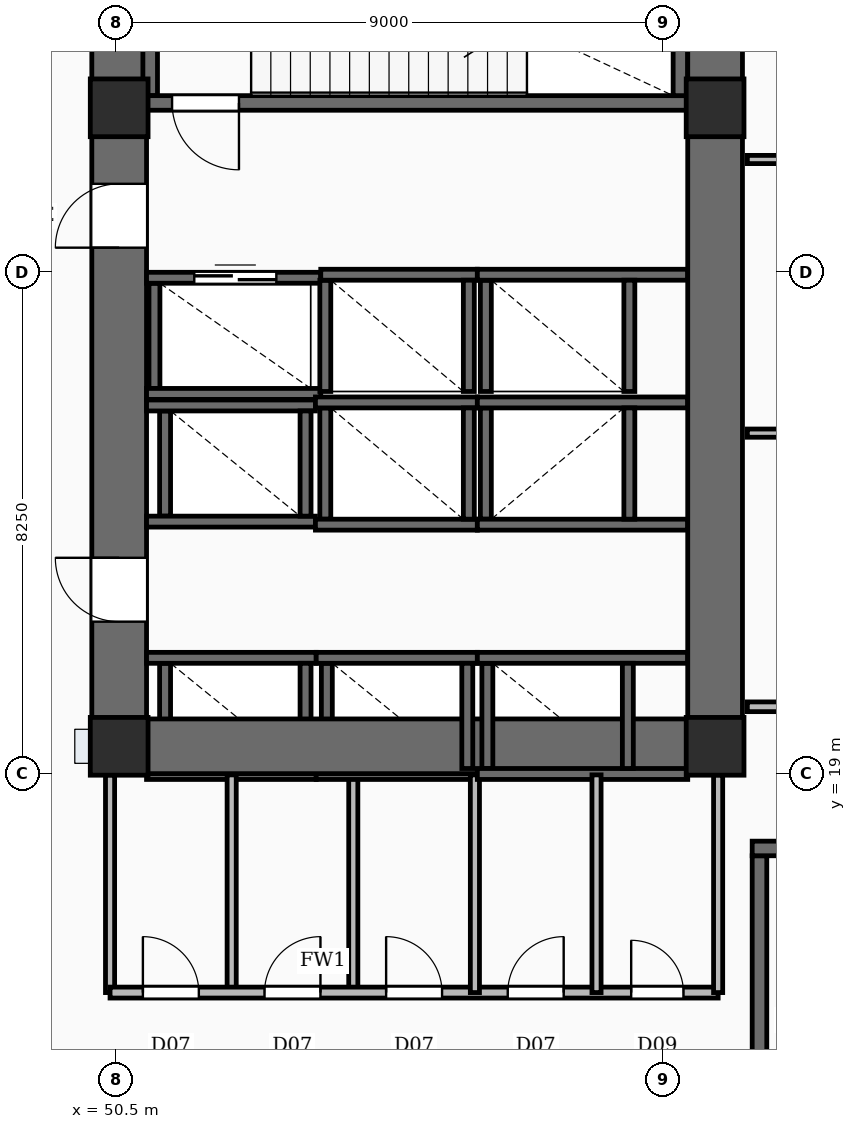
"""IFC4 building model, lengths in metres.
Left out: names, types, materials, properties, quantities, classifications, styles, units other than length and angle.
Written with IfcOpenShell. Run it as: python <this file> out.ifc"""

import sys

from ifc_helpers import new_model, si_unit, direction, frame, frame_2d, origin, origin_2d, place, context, subcontext, project, spatial, rectangle, extrude, element, fill, save


model = new_model("IFC4")
c1 = context("Model", 3, precision=1e-05, world=origin(), true_north=direction((0.0, 1.0)))
c2 = subcontext(c1, "Body", "Model", "MODEL_VIEW")
j1 = project(units=[si_unit("LENGTHUNIT", "METRE"), si_unit("PLANEANGLEUNIT", "RADIAN")], contexts=[c1])
p1 = place(None, origin())
s1 = spatial("IfcSite", under=j1, at=p1, CompositionType="ELEMENT")
p2 = place(p1, origin())
s2 = spatial("IfcBuilding", under=s1, at=p2, CompositionType="ELEMENT")
p3 = place(p2, frame((0.0, 0.0, 18.0)))
s3 = spatial("IfcBuildingStorey", under=s2, at=p3, CompositionType="ELEMENT", Elevation=18.0)
p4 = place(p3, frame((50.55, 19.0, -0.35), z_axis=(0.0, 0.0, 1.0), x_axis=(0.0, 1.0, 0.0)))
e1 = element("IfcWall", 1, at=p4, inside=s3, PredefinedType="SHEAR", context=c2, shape_type="SweptSolid", body=[
    extrude(rectangle(XDim=20.8, YDim=0.9, at=frame_2d((10.4, 0.0))), origin(), (0.0, 0.0, 1.0), 5.0),
])
p5 = place(p4, frame((2.5, 0.0, 0.35)))
e2 = element("IfcOpeningElement", 2, at=p5, cuts=e1, PredefinedType="OPENING", context=c2, shape_type="SweptSolid", body=[
    extrude(rectangle(XDim=1.05, YDim=2.15, at=frame_2d((0.525, 1.075))), frame((0.0, 0.46, 0.0), z_axis=(0.0, -1.0, 0.0), x_axis=(1.0, 0.0, 0.0)), (0.0, 0.0, 1.0), 0.92),
])
p6 = place(p4, frame((8.65, 0.0, 0.35)))
e3 = element("IfcOpeningElement", 3, at=p6, cuts=e1, PredefinedType="OPENING", context=c2, shape_type="SweptSolid", body=[
    extrude(rectangle(XDim=1.05, YDim=2.15, at=frame_2d((0.525, 1.075))), frame((0.0, 0.46, 0.0), z_axis=(0.0, -1.0, 0.0), x_axis=(1.0, 0.0, 0.0)), (0.0, 0.0, 1.0), 0.92),
])
p7 = place(p4, frame((14.62, 0.0, 0.35)))
e4 = element("IfcOpeningElement", 4, at=p7, cuts=e1, PredefinedType="OPENING", context=c2, shape_type="SweptSolid", body=[
    extrude(rectangle(XDim=1.1, YDim=2.15, at=frame_2d((0.55, 1.075))), frame((0.0, 0.46, 0.0), z_axis=(0.0, -1.0, 0.0), x_axis=(1.0, 0.0, 0.0)), (0.0, 0.0, 1.0), 0.92),
])
p8 = place(p3, frame((60.35, 19.0, -0.35), z_axis=(0.0, 0.0, 1.0), x_axis=(0.0, 1.0, 0.0)))
e5 = element("IfcWall", 5, at=p8, inside=s3, PredefinedType="SHEAR", context=c2, shape_type="SweptSolid", body=[
    extrude(rectangle(XDim=20.8, YDim=0.9, at=frame_2d((10.4, 0.0))), origin(), (0.0, 0.0, 1.0), 5.0),
])
p9 = place(p3, frame((51.0, 19.45, -0.35), z_axis=(0.0, 0.0, 1.0), x_axis=(1.0, 0.0, 0.0)))
e6 = element("IfcWall", 6, at=p9, inside=s3, PredefinedType="SHEAR", context=c2, shape_type="SweptSolid", body=[
    extrude(rectangle(XDim=8.9, YDim=0.9, at=frame_2d((4.45, 0.0))), origin(), (0.0, 0.0, 1.0), 5.0),
])
for number, where, z_axis, x_axis in (
    (7, (50.55, 19.45, -0.35), (0.0, 0.0, 1.0), (1.0, 0.0, 0.0)),
    (8, (60.35, 19.45, -0.35), (0.0, 0.0, 1.0), (1.0, 0.0, 0.0)),
    (9, (50.55, 29.95, -0.35), (0.0, 0.0, 1.0), (1.0, 0.0, 0.0)),
    (10, (60.35, 29.95, -0.35), (0.0, 0.0, 1.0), (1.0, 0.0, 0.0)),
):
    element("IfcColumn", number, at=place(p3, frame(where, z_axis=z_axis, x_axis=x_axis)), inside=s3, PredefinedType="COLUMN", context=c2, shape_type="SweptSolid", body=[
        extrude(rectangle(XDim=0.95, YDim=0.95, at=origin_2d()), origin(), (0.0, 0.0, 1.0), 5.0),
    ])
p10 = place(p3, frame((60.96, 17.77, 0.0), z_axis=(0.0, 0.0, 1.0), x_axis=(1.0, 0.0, 0.0)))
e11 = element("IfcWall", 11, at=p10, inside=s3, PredefinedType="SOLIDWALL", context=c2, shape_type="SweptSolid", body=[
    extrude(rectangle(XDim=9.88, YDim=0.24, at=frame_2d((4.94, 0.0))), origin(), (0.0, 0.0, 1.0), 4.65),
])
p11 = place(p10, frame((0.69, 0.0, 0.0)))
e12 = element("IfcOpeningElement", 12, at=p11, cuts=e11, PredefinedType="OPENING", context=c2, shape_type="SweptSolid", body=[
    extrude(rectangle(XDim=1.1, YDim=2.15, at=frame_2d((0.55, 1.075))), frame((0.0, 0.13, 0.0), z_axis=(0.0, -1.0, 0.0), x_axis=(1.0, 0.0, 0.0)), (0.0, 0.0, 1.0), 0.26),
])
p12 = place(p3, frame((61.08, 13.5, 0.0), z_axis=(0.0, 0.0, 1.0), x_axis=(0.0, 1.0, 0.0)))
e13 = element("IfcWall", 13, at=p12, inside=s3, PredefinedType="SOLIDWALL", context=c2, shape_type="SweptSolid", body=[
    extrude(rectangle(XDim=4.15, YDim=0.24, at=frame_2d((2.075, 0.0))), origin(), (0.0, 0.0, 1.0), 4.65),
])
p13 = place(p3, frame((59.9, 30.03, 0.0), z_axis=(0.0, 0.0, 1.0), x_axis=(-1.0, 0.0, 0.0)))
e14 = element("IfcWall", 14, at=p13, inside=s3, PredefinedType="SOLIDWALL", context=c2, shape_type="SweptSolid", body=[
    extrude(rectangle(XDim=8.9, YDim=0.24, at=frame_2d((4.45, 0.0))), origin(), (0.0, 0.0, 1.0), 4.65),
])
p14 = place(p13, frame((7.38, 0.0, 0.0)))
e15 = element("IfcOpeningElement", 15, at=p14, cuts=e14, PredefinedType="OPENING", context=c2, shape_type="SweptSolid", body=[
    extrude(rectangle(XDim=1.1, YDim=2.15, at=frame_2d((0.55, 1.075))), frame((0.0, 0.13, 0.0), z_axis=(0.0, -1.0, 0.0), x_axis=(1.0, 0.0, 0.0)), (0.0, 0.0, 1.0), 0.26),
])
for number, where, z_axis, x_axis in (
    (16, (51.06, 30.15, 0.0), (0.0, 0.0, 1.0), (0.0, 1.0, 0.0)),
    (17, (59.78, 30.15, 0.0), (0.0, 0.0, 1.0), (0.0, 1.0, 0.0)),
):
    element("IfcWall", number, at=place(p3, frame(where, z_axis=z_axis, x_axis=x_axis)), inside=s3, PredefinedType="SOLIDWALL", context=c2, shape_type="SweptSolid", body=[
        extrude(rectangle(XDim=3.23, YDim=0.24, at=frame_2d((1.615, 0.0))), origin(), (0.0, 0.0, 1.0), 4.65),
    ])
for number, where, z_axis, x_axis in (
    (18, (51.0, 20.905, 0.0), (0.0, 0.0, 1.0), (1.0, 0.0, 0.0)),
    (19, (51.0, 18.995, 0.0), (0.0, 0.0, 1.0), (1.0, 0.0, 0.0)),
):
    element("IfcWall", number, at=place(p3, frame(where, z_axis=z_axis, x_axis=x_axis)), inside=s3, PredefinedType="SOLIDWALL", context=c2, shape_type="SweptSolid", body=[
        extrude(rectangle(XDim=2.79, YDim=0.18, at=frame_2d((1.395, 0.0))), origin(), (0.0, 0.0, 1.0), 4.65),
    ])
for number, where, z_axis, x_axis in (
    (20, (51.305, 19.085, 0.0), (0.0, 0.0, 1.0), (0.0, 1.0, 0.0)),
    (21, (53.615, 19.085, 0.0), (0.0, 0.0, 1.0), (0.0, 1.0, 0.0)),
):
    element("IfcWall", number, at=place(p3, frame(where, z_axis=z_axis, x_axis=x_axis)), inside=s3, PredefinedType="SOLIDWALL", context=c2, shape_type="SweptSolid", body=[
        extrude(rectangle(XDim=1.73, YDim=0.18, at=frame_2d((0.865, 0.0))), origin(), (0.0, 0.0, 1.0), 4.65),
    ])
for number, where, z_axis, x_axis in (
    (22, (53.79, 20.905, 0.0), (0.0, 0.0, 1.0), (1.0, 0.0, 0.0)),
    (23, (53.79, 18.995, 0.0), (0.0, 0.0, 1.0), (1.0, 0.0, 0.0)),
):
    element("IfcWall", number, at=place(p3, frame(where, z_axis=z_axis, x_axis=x_axis)), inside=s3, PredefinedType="SOLIDWALL", context=c2, shape_type="SweptSolid", body=[
        extrude(rectangle(XDim=2.65, YDim=0.18, at=frame_2d((1.325, 0.0))), origin(), (0.0, 0.0, 1.0), 4.65),
    ])
for number, where, z_axis, x_axis in (
    (24, (53.965, 19.085, 0.0), (0.0, 0.0, 1.0), (0.0, 1.0, 0.0)),
    (25, (56.275, 19.085, 0.0), (0.0, 0.0, 1.0), (0.0, 1.0, 0.0)),
):
    element("IfcWall", number, at=place(p3, frame(where, z_axis=z_axis, x_axis=x_axis)), inside=s3, PredefinedType="SOLIDWALL", context=c2, shape_type="SweptSolid", body=[
        extrude(rectangle(XDim=1.73, YDim=0.18, at=frame_2d((0.865, 0.0))), origin(), (0.0, 0.0, 1.0), 4.65),
    ])
for number, where, z_axis, x_axis in (
    (26, (56.44, 20.905, 0.0), (0.0, 0.0, 1.0), (1.0, 0.0, 0.0)),
    (27, (56.44, 18.995, 0.0), (0.0, 0.0, 1.0), (1.0, 0.0, 0.0)),
):
    element("IfcWall", number, at=place(p3, frame(where, z_axis=z_axis, x_axis=x_axis)), inside=s3, PredefinedType="SOLIDWALL", context=c2, shape_type="SweptSolid", body=[
        extrude(rectangle(XDim=3.46, YDim=0.18, at=frame_2d((1.73, 0.0))), origin(), (0.0, 0.0, 1.0), 4.65),
    ])
for number, where, z_axis, x_axis in (
    (28, (56.605, 19.085, 0.0), (0.0, 0.0, 1.0), (0.0, 1.0, 0.0)),
    (29, (58.915, 19.085, 0.0), (0.0, 0.0, 1.0), (0.0, 1.0, 0.0)),
):
    element("IfcWall", number, at=place(p3, frame(where, z_axis=z_axis, x_axis=x_axis)), inside=s3, PredefinedType="SOLIDWALL", context=c2, shape_type="SweptSolid", body=[
        extrude(rectangle(XDim=1.73, YDim=0.18, at=frame_2d((0.865, 0.0))), origin(), (0.0, 0.0, 1.0), 4.65),
    ])
for number, where, z_axis, x_axis in (
    (30, (51.0, 25.055, 0.0), (0.0, 0.0, 1.0), (1.0, 0.0, 0.0)),
    (31, (51.0, 23.145, 0.0), (0.0, 0.0, 1.0), (1.0, 0.0, 0.0)),
):
    element("IfcWall", number, at=place(p3, frame(where, z_axis=z_axis, x_axis=x_axis)), inside=s3, PredefinedType="SOLIDWALL", context=c2, shape_type="SweptSolid", body=[
        extrude(rectangle(XDim=2.778, YDim=0.18, at=frame_2d((1.389, 0.0))), origin(), (0.0, 0.0, 1.0), 4.65),
    ])
for number, where, z_axis, x_axis in (
    (32, (51.305, 23.235, 0.0), (0.0, 0.0, 1.0), (0.0, 1.0, 0.0)),
    (33, (53.615, 23.235, 0.0), (0.0, 0.0, 1.0), (0.0, 1.0, 0.0)),
):
    element("IfcWall", number, at=place(p3, frame(where, z_axis=z_axis, x_axis=x_axis)), inside=s3, PredefinedType="SOLIDWALL", context=c2, shape_type="SweptSolid", body=[
        extrude(rectangle(XDim=1.73, YDim=0.18, at=frame_2d((0.865, 0.0))), origin(), (0.0, 0.0, 1.0), 4.65),
    ])
for number, where, z_axis, x_axis in (
    (34, (53.778, 25.105, 0.0), (0.0, 0.0, 1.0), (1.0, 0.0, 0.0)),
    (35, (53.778, 23.095, 0.0), (0.0, 0.0, 1.0), (1.0, 0.0, 0.0)),
):
    element("IfcWall", number, at=place(p3, frame(where, z_axis=z_axis, x_axis=x_axis)), inside=s3, PredefinedType="SOLIDWALL", context=c2, shape_type="SweptSolid", body=[
        extrude(rectangle(XDim=2.662, YDim=0.18, at=frame_2d((1.331, 0.0))), origin(), (0.0, 0.0, 1.0), 4.65),
    ])
for number, where, z_axis, x_axis in (
    (36, (53.94, 23.185, 0.0), (0.0, 0.0, 1.0), (0.0, 1.0, 0.0)),
    (37, (56.3, 23.185, 0.0), (0.0, 0.0, 1.0), (0.0, 1.0, 0.0)),
):
    element("IfcWall", number, at=place(p3, frame(where, z_axis=z_axis, x_axis=x_axis)), inside=s3, PredefinedType="SOLIDWALL", context=c2, shape_type="SweptSolid", body=[
        extrude(rectangle(XDim=1.83, YDim=0.18, at=frame_2d((0.915, 0.0))), origin(), (0.0, 0.0, 1.0), 4.65),
    ])
for number, where, z_axis, x_axis in (
    (38, (56.44, 25.105, 0.0), (0.0, 0.0, 1.0), (1.0, 0.0, 0.0)),
    (39, (56.44, 23.095, 0.0), (0.0, 0.0, 1.0), (1.0, 0.0, 0.0)),
):
    element("IfcWall", number, at=place(p3, frame(where, z_axis=z_axis, x_axis=x_axis)), inside=s3, PredefinedType="SOLIDWALL", context=c2, shape_type="SweptSolid", body=[
        extrude(rectangle(XDim=3.46, YDim=0.18, at=frame_2d((1.73, 0.0))), origin(), (0.0, 0.0, 1.0), 4.65),
    ])
for number, where, z_axis, x_axis in (
    (40, (56.58, 23.185, 0.0), (0.0, 0.0, 1.0), (0.0, 1.0, 0.0)),
    (41, (58.94, 23.185, 0.0), (0.0, 0.0, 1.0), (0.0, 1.0, 0.0)),
):
    element("IfcWall", number, at=place(p3, frame(where, z_axis=z_axis, x_axis=x_axis)), inside=s3, PredefinedType="SOLIDWALL", context=c2, shape_type="SweptSolid", body=[
        extrude(rectangle(XDim=1.83, YDim=0.18, at=frame_2d((0.915, 0.0))), origin(), (0.0, 0.0, 1.0), 4.65),
    ])
p15 = place(p3, frame((53.865, 27.205, 0.0), z_axis=(0.0, 0.0, 1.0), x_axis=(1.0, 0.0, 0.0)))
e42 = element("IfcWall", 42, at=p15, inside=s3, PredefinedType="SOLIDWALL", context=c2, shape_type="SweptSolid", body=[
    extrude(rectangle(XDim=2.575, YDim=0.18, at=frame_2d((1.288, 0.0))), origin(), (0.0, 0.0, 1.0), 4.65),
])
for number, where, z_axis, x_axis in (
    (43, (53.94, 25.285, 0.0), (0.0, 0.0, 1.0), (0.0, 1.0, 0.0)),
    (44, (56.3, 25.285, 0.0), (0.0, 0.0, 1.0), (0.0, 1.0, 0.0)),
):
    element("IfcWall", number, at=place(p3, frame(where, z_axis=z_axis, x_axis=x_axis)), inside=s3, PredefinedType="SOLIDWALL", context=c2, shape_type="SweptSolid", body=[
        extrude(rectangle(XDim=1.83, YDim=0.18, at=frame_2d((0.915, 0.0))), origin(), (0.0, 0.0, 1.0), 4.65),
    ])
p16 = place(p3, frame((56.44, 27.205, 0.0), z_axis=(0.0, 0.0, 1.0), x_axis=(1.0, 0.0, 0.0)))
e45 = element("IfcWall", 45, at=p16, inside=s3, PredefinedType="SOLIDWALL", context=c2, shape_type="SweptSolid", body=[
    extrude(rectangle(XDim=3.46, YDim=0.18, at=frame_2d((1.73, 0.0))), origin(), (0.0, 0.0, 1.0), 4.65),
])
for number, where, z_axis, x_axis in (
    (46, (56.58, 25.285, 0.0), (0.0, 0.0, 1.0), (0.0, 1.0, 0.0)),
    (47, (58.94, 25.285, 0.0), (0.0, 0.0, 1.0), (0.0, 1.0, 0.0)),
):
    element("IfcWall", number, at=place(p3, frame(where, z_axis=z_axis, x_axis=x_axis)), inside=s3, PredefinedType="SOLIDWALL", context=c2, shape_type="SweptSolid", body=[
        extrude(rectangle(XDim=1.83, YDim=0.18, at=frame_2d((0.915, 0.0))), origin(), (0.0, 0.0, 1.0), 4.65),
    ])
p17 = place(p3, frame((51.0, 27.155, 0.0), z_axis=(0.0, 0.0, 1.0), x_axis=(1.0, 0.0, 0.0)))
e48 = element("IfcWall", 48, at=p17, inside=s3, PredefinedType="SOLIDWALL", context=c2, shape_type="SweptSolid", body=[
    extrude(rectangle(XDim=2.865, YDim=0.18, at=frame_2d((1.433, 0.0))), origin(), (0.0, 0.0, 1.0), 4.65),
])
p18 = place(p17, frame((0.785, 0.0, 0.0)))
e49 = element("IfcOpeningElement", 49, at=p18, cuts=e48, PredefinedType="OPENING", context=c2, shape_type="SweptSolid", body=[
    extrude(rectangle(XDim=1.35, YDim=2.3, at=frame_2d((0.675, 1.15))), frame((0.0, 0.1, 0.0), z_axis=(0.0, -1.0, 0.0), x_axis=(1.0, 0.0, 0.0)), (0.0, 0.0, 1.0), 0.2),
])
p19 = place(p3, frame((51.0, 25.245, 0.0), z_axis=(0.0, 0.0, 1.0), x_axis=(1.0, 0.0, 0.0)))
e50 = element("IfcWall", 50, at=p19, inside=s3, PredefinedType="SOLIDWALL", context=c2, shape_type="SweptSolid", body=[
    extrude(rectangle(XDim=2.865, YDim=0.18, at=frame_2d((1.433, 0.0))), origin(), (0.0, 0.0, 1.0), 4.65),
])
p20 = place(p3, frame((51.13, 25.335, 0.0), z_axis=(0.0, 0.0, 1.0), x_axis=(0.0, 1.0, 0.0)))
e51 = element("IfcWall", 51, at=p20, inside=s3, PredefinedType="SOLIDWALL", context=c2, shape_type="SweptSolid", body=[
    extrude(rectangle(XDim=1.73, YDim=0.18, at=frame_2d((0.865, 0.0))), origin(), (0.0, 0.0, 1.0), 4.65),
])
for number, where, z_axis, x_axis in (
    (52, (52.4, 15.4, 0.0), (0.0, 0.0, 1.0), (0.0, 1.0, 0.0)),
    (53, (54.4, 15.4, 0.0), (0.0, 0.0, 1.0), (0.0, 1.0, 0.0)),
    (54, (56.4, 15.4, 0.0), (0.0, 0.0, 1.0), (0.0, 1.0, 0.0)),
    (55, (58.4, 15.4, 0.0), (0.0, 0.0, 1.0), (0.0, 1.0, 0.0)),
):
    element("IfcWall", number, at=place(p3, frame(where, z_axis=z_axis, x_axis=x_axis)), inside=s3, PredefinedType="PARTITIONING", context=c2, shape_type="SweptSolid", body=[
        extrude(rectangle(XDim=3.58, YDim=0.15, at=frame_2d((1.79, 0.0))), origin(), (0.0, 0.0, 1.0), 3.71),
    ])
p21 = place(p3, frame((50.4, 15.4, 0.0), z_axis=(0.0, 0.0, 1.0), x_axis=(1.0, 0.0, 0.0)))
e56 = element("IfcWall", 56, at=p21, inside=s3, PredefinedType="SOLIDWALL", context=c2, shape_type="SweptSolid", body=[
    extrude(rectangle(XDim=10.0, YDim=0.18, at=frame_2d((5.0, 0.0))), origin(), (0.0, 0.0, 1.0), 3.71),
])
p22 = place(p21, frame((0.54, 0.0, 0.0)))
e57 = element("IfcOpeningElement", 57, at=p22, cuts=e56, PredefinedType="OPENING", context=c2, shape_type="SweptSolid", body=[
    extrude(rectangle(XDim=0.92, YDim=2.1, at=frame_2d((0.46, 1.05))), frame((0.0, 0.1, 0.0), z_axis=(0.0, -1.0, 0.0), x_axis=(1.0, 0.0, 0.0)), (0.0, 0.0, 1.0), 0.2),
])
p23 = place(p21, frame((2.54, 0.0, 0.0)))
e58 = element("IfcOpeningElement", 58, at=p23, cuts=e56, PredefinedType="OPENING", context=c2, shape_type="SweptSolid", body=[
    extrude(rectangle(XDim=0.92, YDim=2.1, at=frame_2d((0.46, 1.05))), frame((0.0, 0.1, 0.0), z_axis=(0.0, -1.0, 0.0), x_axis=(1.0, 0.0, 0.0)), (0.0, 0.0, 1.0), 0.2),
])
p24 = place(p21, frame((4.54, 0.0, 0.0)))
e59 = element("IfcOpeningElement", 59, at=p24, cuts=e56, PredefinedType="OPENING", context=c2, shape_type="SweptSolid", body=[
    extrude(rectangle(XDim=0.92, YDim=2.1, at=frame_2d((0.46, 1.05))), frame((0.0, 0.1, 0.0), z_axis=(0.0, -1.0, 0.0), x_axis=(1.0, 0.0, 0.0)), (0.0, 0.0, 1.0), 0.2),
])
p25 = place(p21, frame((6.54, 0.0, 0.0)))
e60 = element("IfcOpeningElement", 60, at=p25, cuts=e56, PredefinedType="OPENING", context=c2, shape_type="SweptSolid", body=[
    extrude(rectangle(XDim=0.92, YDim=2.1, at=frame_2d((0.46, 1.05))), frame((0.0, 0.1, 0.0), z_axis=(0.0, -1.0, 0.0), x_axis=(1.0, 0.0, 0.0)), (0.0, 0.0, 1.0), 0.2),
])
p26 = place(p21, frame((8.57, 0.0, 0.0)))
e61 = element("IfcOpeningElement", 61, at=p26, cuts=e56, PredefinedType="OPENING", context=c2, shape_type="SweptSolid", body=[
    extrude(rectangle(XDim=0.86, YDim=2.05, at=frame_2d((0.43, 1.025))), frame((0.0, 0.1, 0.0), z_axis=(0.0, -1.0, 0.0), x_axis=(1.0, 0.0, 0.0)), (0.0, 0.0, 1.0), 0.2),
])
for number, where, z_axis, x_axis in (
    (62, (50.4, 15.4, 0.0), (0.0, 0.0, 1.0), (0.0, 1.0, 0.0)),
    (63, (60.4, 15.4, 0.0), (0.0, 0.0, 1.0), (0.0, 1.0, 0.0)),
):
    element("IfcWall", number, at=place(p3, frame(where, z_axis=z_axis, x_axis=x_axis)), inside=s3, PredefinedType="PARTITIONING", context=c2, shape_type="SweptSolid", body=[
        extrude(rectangle(XDim=3.58, YDim=0.15, at=frame_2d((1.79, 0.0))), origin(), (0.0, 0.0, 1.0), 3.71),
    ])
for number, where, z_axis, x_axis in (
    (64, (60.88, 24.6, 0.0), (0.0, 0.0, 1.0), (1.0, 0.0, 0.0)),
    (65, (60.88, 29.1, 0.0), (0.0, 0.0, 1.0), (1.0, 0.0, 0.0)),
):
    element("IfcWall", number, at=place(p3, frame(where, z_axis=z_axis, x_axis=x_axis)), inside=s3, PredefinedType="PARTITIONING", context=c2, shape_type="SweptSolid", body=[
        extrude(rectangle(XDim=10.04, YDim=0.135, at=frame_2d((5.02, 0.0))), origin(), (0.0, 0.0, 1.0), 3.71),
    ])
p27 = place(p3, frame((60.88, 20.1, 0.0), z_axis=(0.0, 0.0, 1.0), x_axis=(1.0, 0.0, 0.0)))
e66 = element("IfcWall", 66, at=p27, inside=s3, PredefinedType="PARTITIONING", context=c2, shape_type="SweptSolid", body=[
    extrude(rectangle(XDim=10.04, YDim=0.16, at=frame_2d((5.02, 0.0))), origin(), (0.0, 0.0, 1.0), 3.71),
])
p28 = place(p5, origin())
e67 = element("IfcDoor", 67, at=p28, inside=s3, OperationType="SINGLE_SWING_RIGHT", PredefinedType="DOOR", context=c2, shape_type="SweptSolid", body=[
    extrude(rectangle(XDim=1.05, YDim=2.15, at=frame_2d((0.525, 1.075))), frame((0.0, 0.025, 0.0), z_axis=(0.0, -1.0, 0.0), x_axis=(1.0, 0.0, 0.0)), (0.0, 0.0, 1.0), 0.05),
])
fill(e2, e67)
p29 = place(p6, origin())
e68 = element("IfcDoor", 68, at=p29, inside=s3, OperationType="SINGLE_SWING_LEFT", PredefinedType="DOOR", context=c2, shape_type="SweptSolid", body=[
    extrude(rectangle(XDim=1.05, YDim=2.15, at=frame_2d((0.525, 1.075))), frame((0.0, 0.025, 0.0), z_axis=(0.0, -1.0, 0.0), x_axis=(1.0, 0.0, 0.0)), (0.0, 0.0, 1.0), 0.05),
])
fill(e3, e68)
p30 = place(p14, origin())
e69 = element("IfcDoor", 69, at=p30, inside=s3, OperationType="SINGLE_SWING_LEFT", PredefinedType="DOOR", context=c2, shape_type="SweptSolid", body=[
    extrude(rectangle(XDim=1.1, YDim=2.15, at=frame_2d((0.55, 1.075))), frame((0.0, 0.025, 0.0), z_axis=(0.0, -1.0, 0.0), x_axis=(1.0, 0.0, 0.0)), (0.0, 0.0, 1.0), 0.05),
])
fill(e15, e69)
p31 = place(p18, origin())
e70 = element("IfcDoor", 70, at=p31, inside=s3, OperationType="DOUBLE_DOOR_SLIDING", PredefinedType="DOOR", context=c2, shape_type="SweptSolid", body=[
    extrude(rectangle(XDim=1.35, YDim=2.3, at=frame_2d((0.675, 1.15))), frame((0.0, 0.025, 0.0), z_axis=(0.0, -1.0, 0.0), x_axis=(1.0, 0.0, 0.0)), (0.0, 0.0, 1.0), 0.05),
])
fill(e49, e70)
p32 = place(p22, origin())
e71 = element("IfcDoor", 71, at=p32, inside=s3, OperationType="SINGLE_SWING_LEFT", PredefinedType="DOOR", context=c2, shape_type="SweptSolid", body=[
    extrude(rectangle(XDim=0.92, YDim=2.1, at=frame_2d((0.46, 1.05))), frame((0.0, 0.025, 0.0), z_axis=(0.0, -1.0, 0.0), x_axis=(1.0, 0.0, 0.0)), (0.0, 0.0, 1.0), 0.05),
])
fill(e57, e71)
p33 = place(p23, origin())
e72 = element("IfcDoor", 72, at=p33, inside=s3, OperationType="SINGLE_SWING_RIGHT", PredefinedType="DOOR", context=c2, shape_type="SweptSolid", body=[
    extrude(rectangle(XDim=0.92, YDim=2.1, at=frame_2d((0.46, 1.05))), frame((0.0, 0.025, 0.0), z_axis=(0.0, -1.0, 0.0), x_axis=(1.0, 0.0, 0.0)), (0.0, 0.0, 1.0), 0.05),
])
fill(e58, e72)
p34 = place(p24, origin())
e73 = element("IfcDoor", 73, at=p34, inside=s3, OperationType="SINGLE_SWING_LEFT", PredefinedType="DOOR", context=c2, shape_type="SweptSolid", body=[
    extrude(rectangle(XDim=0.92, YDim=2.1, at=frame_2d((0.46, 1.05))), frame((0.0, 0.025, 0.0), z_axis=(0.0, -1.0, 0.0), x_axis=(1.0, 0.0, 0.0)), (0.0, 0.0, 1.0), 0.05),
])
fill(e59, e73)
p35 = place(p25, origin())
e74 = element("IfcDoor", 74, at=p35, inside=s3, OperationType="SINGLE_SWING_RIGHT", PredefinedType="DOOR", context=c2, shape_type="SweptSolid", body=[
    extrude(rectangle(XDim=0.92, YDim=2.1, at=frame_2d((0.46, 1.05))), frame((0.0, 0.025, 0.0), z_axis=(0.0, -1.0, 0.0), x_axis=(1.0, 0.0, 0.0)), (0.0, 0.0, 1.0), 0.05),
])
fill(e60, e74)
p36 = place(p26, origin())
e75 = element("IfcDoor", 75, at=p36, inside=s3, OperationType="SINGLE_SWING_LEFT", PredefinedType="DOOR", context=c2, shape_type="SweptSolid", body=[
    extrude(rectangle(XDim=0.86, YDim=2.05, at=frame_2d((0.43, 1.025))), frame((0.0, 0.025, 0.0), z_axis=(0.0, -1.0, 0.0), x_axis=(1.0, 0.0, 0.0)), (0.0, 0.0, 1.0), 0.05),
])
fill(e61, e75)
save(model, sys.argv[1])
